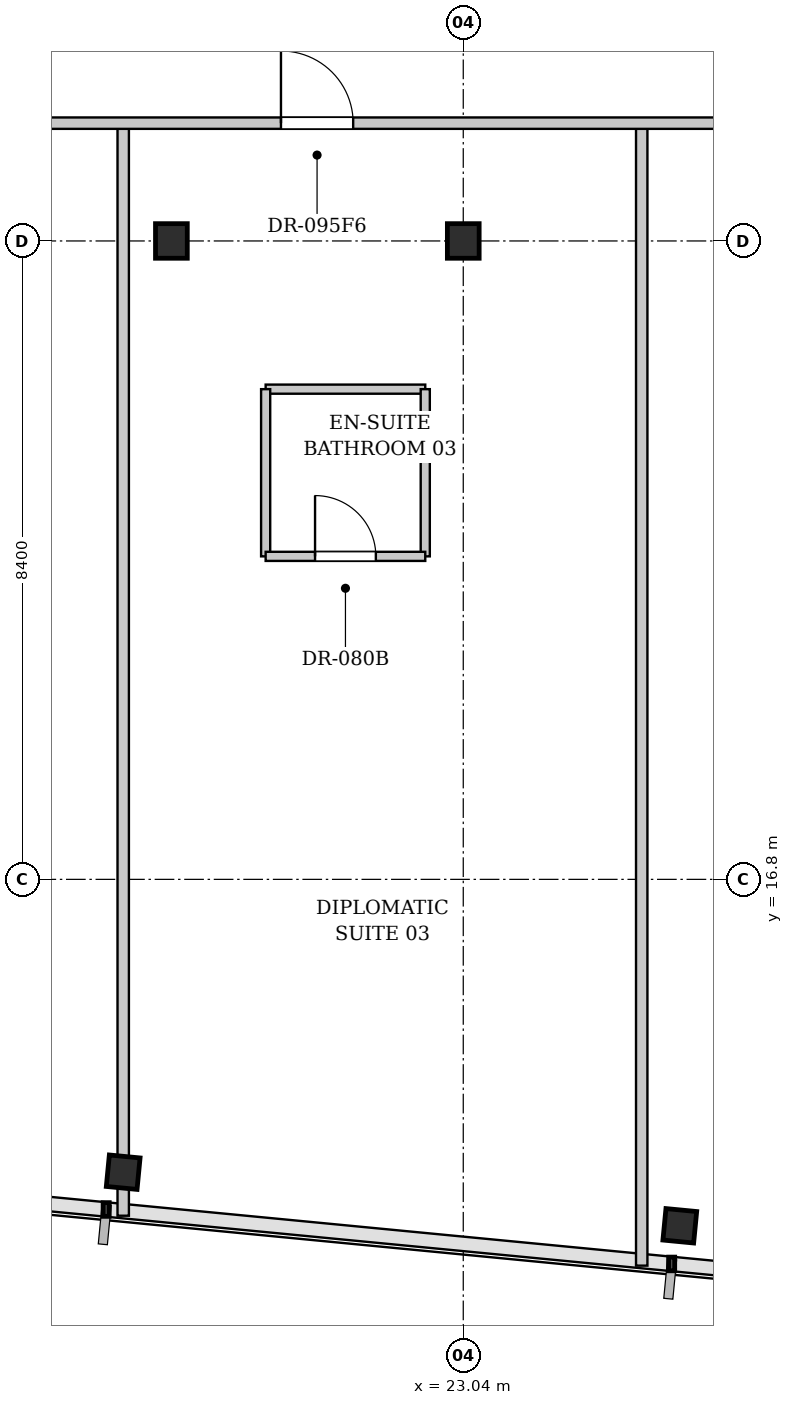
"""IFC4 building model, lengths in metres.
Left out: names, types, materials, properties, quantities, classifications, styles, units other than length and angle.
Written with IfcOpenShell. Run it as: python <this file> out.ifc"""

import sys

from ifc_helpers import new_model, si_unit, direction, frame, frame_2d, origin, origin_2d, place, context, subcontext, project, spatial, rectangle, i_section, extrude, element, fill, save


model = new_model("IFC4")
c1 = context("Model", 3, precision=1e-05, world=origin(), true_north=direction((0.0, 1.0)))
c2 = subcontext(c1, "Body", "Model", "MODEL_VIEW")
j1 = project(units=[si_unit("LENGTHUNIT", "METRE"), si_unit("PLANEANGLEUNIT", "RADIAN")], contexts=[c1])
p1 = place(None, origin())
s1 = spatial("IfcSite", under=j1, at=p1, CompositionType="ELEMENT")
p2 = place(p1, origin())
s2 = spatial("IfcBuilding", under=s1, at=p2, CompositionType="ELEMENT")
p3 = place(p2, frame((0.0, 0.0, 172.1)))
s3 = spatial("IfcBuildingStorey", under=s2, at=p3, CompositionType="ELEMENT", Elevation=172.1)
for number, where, z_axis, x_axis in (
    (1, (23.04, 25.2, 0.0), (0.0, 0.0, 1.0), (1.0, 0.0, 0.0)),
    (2, (19.2, 25.2, 0.0), (0.0, 0.0, 1.0), (1.0, 0.0, 0.0)),
):
    element("IfcColumn", number, at=place(p3, frame(where, z_axis=z_axis, x_axis=x_axis)), inside=s3, PredefinedType="COLUMN", context=c2, shape_type="SweptSolid", body=[
        extrude(i_section(OverallWidth=0.418, OverallDepth=0.455, WebThickness=0.042, FlangeThickness=0.068, FilletRadius=0.015, at=origin_2d()), origin(), (0.0, 0.0, 1.0), 3.3),
    ])
for number, where, z_axis, x_axis in (
    (3, (18.566, 12.947, 0.0), (0.0, 0.0, 1.0), (0.995, -0.096, 0.0)),
    (4, (25.889, 12.242, 0.0), (0.0, 0.0, 1.0), (0.995, -0.096, 0.0)),
):
    element("IfcColumn", number, at=place(p3, frame(where, z_axis=z_axis, x_axis=x_axis)), inside=s3, PredefinedType="COLUMN", context=c2, shape_type="SweptSolid", body=[
        extrude(i_section(OverallWidth=0.406, OverallDepth=0.416, WebThickness=0.03, FlangeThickness=0.048, FilletRadius=0.015, at=origin_2d()), origin(), (0.0, 0.0, 1.0), 3.3),
    ])
p4 = place(p3, frame((20.44, 23.25, 0.0), z_axis=(0.0, 0.0, 1.0), x_axis=(1.0, 0.0, 0.0)))
e5 = element("IfcWall", 5, at=p4, inside=s3, PredefinedType="PARTITIONING", context=c2, shape_type="SweptSolid", body=[
    extrude(rectangle(XDim=2.1, YDim=0.12, at=frame_2d((1.05, 0.0))), origin(), (0.0, 0.0, 1.0), 3.08),
])
for number, where, z_axis, x_axis in (
    (6, (20.44, 21.05, 0.0), (0.0, 0.0, 1.0), (0.0, 1.0, 0.0)),
    (7, (22.54, 21.05, 0.0), (0.0, 0.0, 1.0), (0.0, 1.0, 0.0)),
):
    element("IfcWall", number, at=place(p3, frame(where, z_axis=z_axis, x_axis=x_axis)), inside=s3, PredefinedType="PARTITIONING", context=c2, shape_type="SweptSolid", body=[
        extrude(rectangle(XDim=2.2, YDim=0.12, at=frame_2d((1.1, 0.0))), origin(), (0.0, 0.0, 1.0), 3.08),
    ])
p5 = place(p3, frame((20.44, 21.05, 0.0), z_axis=(0.0, 0.0, 1.0), x_axis=(1.0, 0.0, 0.0)))
e8 = element("IfcWall", 8, at=p5, inside=s3, PredefinedType="PARTITIONING", context=c2, shape_type="SweptSolid", body=[
    extrude(rectangle(XDim=2.1, YDim=0.12, at=frame_2d((1.05, 0.0))), origin(), (0.0, 0.0, 1.0), 3.08),
])
p6 = place(p5, frame((0.65, 0.0, 0.0)))
e9 = element("IfcOpeningElement", 9, at=p6, cuts=e8, PredefinedType="OPENING", context=c2, shape_type="SweptSolid", body=[
    extrude(rectangle(XDim=0.8, YDim=2.1, at=frame_2d((0.4, 1.05))), frame((0.0, 0.07, 0.0), z_axis=(0.0, -1.0, 0.0), x_axis=(1.0, 0.0, 0.0)), (0.0, 0.0, 1.0), 0.14),
])
p7 = place(p3, frame((18.566, 12.374, 0.0), z_axis=(0.0, 0.0, 1.0), x_axis=(0.0, 1.0, 0.0)))
e10 = element("IfcWall", 10, at=p7, inside=s3, PredefinedType="PARTITIONING", context=c2, shape_type="SweptSolid", body=[
    extrude(rectangle(XDim=14.396, YDim=0.15, at=frame_2d((7.198, 0.0))), origin(), (0.0, 0.0, 1.0), 2.475),
])
p8 = place(p3, frame((25.388, 11.717, 0.0), z_axis=(0.0, 0.0, 1.0), x_axis=(0.0, 1.0, 0.0)))
e11 = element("IfcWall", 11, at=p8, inside=s3, PredefinedType="PARTITIONING", context=c2, shape_type="SweptSolid", body=[
    extrude(rectangle(XDim=15.053, YDim=0.15, at=frame_2d((7.526, 0.0))), origin(), (0.0, 0.0, 1.0), 2.475),
])
p9 = place(p3, frame((2.229, 26.75, 0.0), z_axis=(0.0, 0.0, 1.0), x_axis=(1.0, 0.0, 0.0)))
e12 = element("IfcWall", 12, at=p9, inside=s3, PredefinedType="PARTITIONING", context=c2, shape_type="SweptSolid", body=[
    extrude(rectangle(XDim=57.505, YDim=0.15, at=frame_2d((28.752, 0.0))), origin(), (0.0, 0.0, 1.0), 2.475),
])
p10 = place(p9, frame((8.624, 0.0, 0.0)))
e13 = element("IfcOpeningElement", 13, at=p10, cuts=e12, PredefinedType="OPENING", context=c2, shape_type="SweptSolid", body=[
    extrude(rectangle(XDim=0.95, YDim=2.15, at=frame_2d((0.475, 1.075))), frame((0.0, 0.085, 0.0), z_axis=(0.0, -1.0, 0.0), x_axis=(1.0, 0.0, 0.0)), (0.0, 0.0, 1.0), 0.17),
])
p11 = place(p9, frame((13.393, 0.0, 0.0)))
e14 = element("IfcOpeningElement", 14, at=p11, cuts=e12, PredefinedType="OPENING", context=c2, shape_type="SweptSolid", body=[
    extrude(rectangle(XDim=0.95, YDim=2.15, at=frame_2d((0.475, 1.075))), frame((0.0, 0.085, 0.0), z_axis=(0.0, -1.0, 0.0), x_axis=(1.0, 0.0, 0.0)), (0.0, 0.0, 1.0), 0.17),
])
p12 = place(p9, frame((18.412, 0.0, 0.0)))
e15 = element("IfcOpeningElement", 15, at=p12, cuts=e12, PredefinedType="OPENING", context=c2, shape_type="SweptSolid", body=[
    extrude(rectangle(XDim=0.95, YDim=2.15, at=frame_2d((0.475, 1.075))), frame((0.0, 0.085, 0.0), z_axis=(0.0, -1.0, 0.0), x_axis=(1.0, 0.0, 0.0)), (0.0, 0.0, 1.0), 0.17),
])
p13 = place(p9, frame((25.935, 0.0, 0.0)))
e16 = element("IfcOpeningElement", 16, at=p13, cuts=e12, PredefinedType="OPENING", context=c2, shape_type="SweptSolid", body=[
    extrude(rectangle(XDim=0.95, YDim=2.15, at=frame_2d((0.475, 1.075))), frame((0.0, 0.085, 0.0), z_axis=(0.0, -1.0, 0.0), x_axis=(1.0, 0.0, 0.0)), (0.0, 0.0, 1.0), 0.17),
])
p14 = place(p9, frame((33.733, 0.0, 0.0)))
e17 = element("IfcOpeningElement", 17, at=p14, cuts=e12, PredefinedType="OPENING", context=c2, shape_type="SweptSolid", body=[
    extrude(rectangle(XDim=0.95, YDim=2.15, at=frame_2d((0.475, 1.075))), frame((0.0, 0.085, 0.0), z_axis=(0.0, -1.0, 0.0), x_axis=(1.0, 0.0, 0.0)), (0.0, 0.0, 1.0), 0.17),
])
p15 = place(p9, frame((40.441, 0.0, 0.0)))
e18 = element("IfcOpeningElement", 18, at=p15, cuts=e12, PredefinedType="OPENING", context=c2, shape_type="SweptSolid", body=[
    extrude(rectangle(XDim=0.95, YDim=2.15, at=frame_2d((0.475, 1.075))), frame((0.0, 0.085, 0.0), z_axis=(0.0, -1.0, 0.0), x_axis=(1.0, 0.0, 0.0)), (0.0, 0.0, 1.0), 0.17),
])
p16 = place(p9, frame((45.822, 0.0, 0.0)))
e19 = element("IfcOpeningElement", 19, at=p16, cuts=e12, PredefinedType="OPENING", context=c2, shape_type="SweptSolid", body=[
    extrude(rectangle(XDim=0.95, YDim=2.15, at=frame_2d((0.475, 1.075))), frame((0.0, 0.085, 0.0), z_axis=(0.0, -1.0, 0.0), x_axis=(1.0, 0.0, 0.0)), (0.0, 0.0, 1.0), 0.17),
])
p17 = place(p9, frame((49.073, 0.0, 0.0)))
e20 = element("IfcOpeningElement", 20, at=p17, cuts=e12, PredefinedType="OPENING", context=c2, shape_type="SweptSolid", body=[
    extrude(rectangle(XDim=0.95, YDim=2.15, at=frame_2d((0.475, 1.075))), frame((0.0, 0.085, 0.0), z_axis=(0.0, -1.0, 0.0), x_axis=(1.0, 0.0, 0.0)), (0.0, 0.0, 1.0), 0.17),
])
p18 = place(p6, origin())
e21 = element("IfcDoor", 21, at=p18, inside=s3, OperationType="SINGLE_SWING_LEFT", PredefinedType="DOOR", context=c2, shape_type="SweptSolid", body=[
    extrude(rectangle(XDim=0.8, YDim=2.1, at=frame_2d((0.4, 1.05))), frame((0.0, 0.025, 0.0), z_axis=(0.0, -1.0, 0.0), x_axis=(1.0, 0.0, 0.0)), (0.0, 0.0, 1.0), 0.05),
])
fill(e9, e21)
p19 = place(p12, origin())
e22 = element("IfcDoor", 22, at=p19, inside=s3, OperationType="SINGLE_SWING_LEFT", PredefinedType="DOOR", context=c2, shape_type="SweptSolid", body=[
    extrude(rectangle(XDim=0.95, YDim=2.15, at=frame_2d((0.475, 1.075))), frame((0.0, 0.025, 0.0), z_axis=(0.0, -1.0, 0.0), x_axis=(1.0, 0.0, 0.0)), (0.0, 0.0, 1.0), 0.05),
])
fill(e15, e22)
save(model, sys.argv[1])
